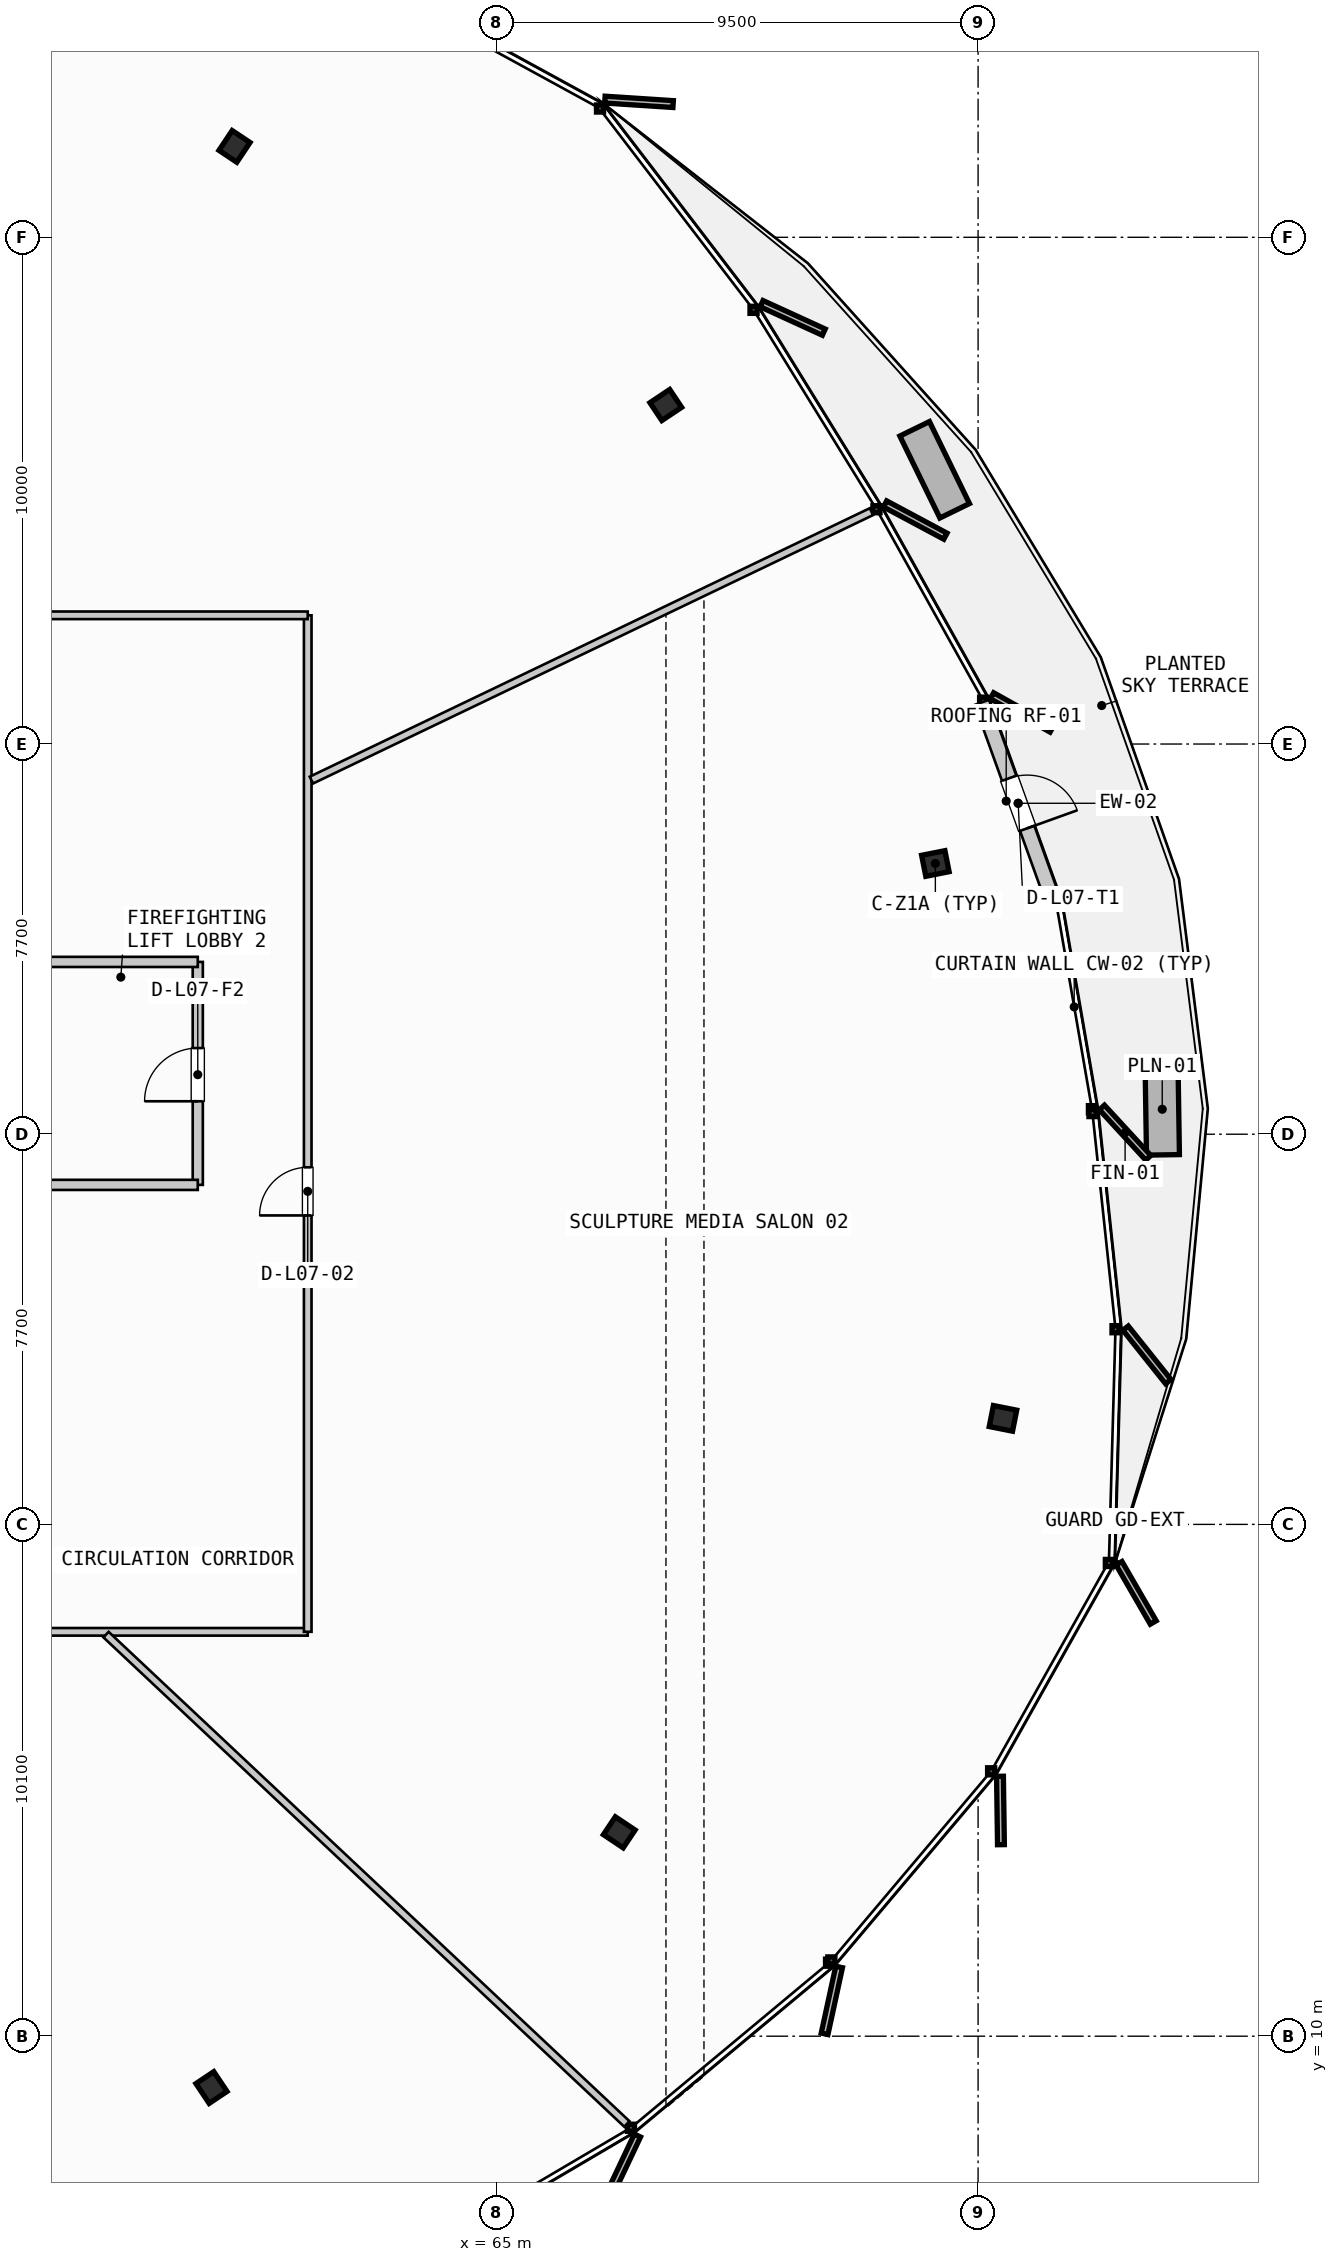
"""IFC4 building model, lengths in metres.
Left out: names, types, materials, properties, quantities, classifications, styles, units other than length and angle.
Written with IfcOpenShell. Run it as: python <this file> out.ifc"""

import sys

from ifc_helpers import new_model, si_unit, direction, frame, frame_2d, origin, origin_2d, place, context, subcontext, project, spatial, rectangle, i_section, extrude, source, transform, mapped, element, fill, save


model = new_model("IFC4")
c1 = context("Model", 3, precision=1e-05, world=origin(), true_north=direction((0.0, 1.0)))
c2 = subcontext(c1, "Body", "Model", "MODEL_VIEW")
j1 = project(units=[si_unit("LENGTHUNIT", "METRE"), si_unit("PLANEANGLEUNIT", "RADIAN")], contexts=[c1])
p1 = place(None, origin())
s1 = spatial("IfcSite", under=j1, at=p1, CompositionType="ELEMENT")
p2 = place(p1, origin())
s2 = spatial("IfcBuilding", under=s1, at=p2, CompositionType="ELEMENT")
p3 = place(p2, frame((0.0, 0.0, 33.4)))
s3 = spatial("IfcBuildingStorey", under=s2, at=p3, CompositionType="ELEMENT", Elevation=33.4)
m1 = source(origin(), c2, "Body", "SweptSolid", [
    extrude(i_section(OverallWidth=0.423, OverallDepth=0.469, WebThickness=0.051, FlangeThickness=0.081, FilletRadius=0.015, at=origin_2d()), origin(), (0.0, 0.0, 1.0), 3.55),
])
for number, where, z_axis, x_axis in (
    (1, (73.657, 33.142, 0.0), (0.0, 0.0, 1.0), (0.981, 0.195, 0.0)),
    (2, (68.336, 42.19, 0.0), (0.0, 0.0, 1.0), (0.831, 0.556, 0.0)),
    (3, (59.825, 47.293, 0.0), (0.0, 0.0, 1.0), (0.556, 0.831, 0.0)),
    (4, (59.37, 8.987, 0.0), (0.0, 0.0, 1.0), (0.556, -0.831, 0.0)),
    (5, (67.418, 14.023, 0.0), (0.0, 0.0, 1.0), (0.831, -0.556, 0.0)),
    (6, (74.991, 22.192, 0.0), (0.0, 0.0, 1.0), (0.981, -0.195, 0.0)),
):
    element("IfcColumn", number, at=place(p3, frame(where, z_axis=z_axis, x_axis=x_axis)), inside=s3, PredefinedType="COLUMN", context=c2, shape_type="MappedRepresentation", body=[
        mapped(m1, transform((0.0, 0.0, 0.0), scale=1.0)),
    ])
p4 = place(p3, frame((74.575, 36.323, 0.0), z_axis=(0.0, 0.0, 1.0), x_axis=(0.338388639347, -0.941006444591, 0.0)))
e7 = element("IfcWall", 7, at=p4, inside=s3, PredefinedType="SOLIDWALL", context=c2, shape_type="SweptSolid", body=[
    extrude(rectangle(XDim=4.234, YDim=0.3, at=frame_2d((2.117, 0.0))), origin(), (0.0, 0.0, 1.0), 2.925),
])
p5 = place(p4, frame((1.592, 0.0, 0.0)))
e8 = element("IfcOpeningElement", 8, at=p5, cuts=e7, PredefinedType="OPENING", context=c2, shape_type="SweptSolid", body=[
    extrude(rectangle(XDim=1.05, YDim=2.2, at=frame_2d((0.525, 1.1))), frame((0.0, 0.16, 0.0), z_axis=(0.0, -1.0, 0.0), x_axis=(1.0, 0.0, 0.0)), (0.0, 0.0, 1.0), 0.32),
])
p6 = place(p3, frame((59.1, 26.8, 0.0), z_axis=(0.0, 0.0, 1.0), x_axis=(0.0, 1.0, 0.0)))
e9 = element("IfcWall", 9, at=p6, inside=s3, PredefinedType="PARTITIONING", context=c2, shape_type="SweptSolid", body=[
    extrude(rectangle(XDim=4.4, YDim=0.2, at=frame_2d((2.2, 0.0))), origin(), (0.0, 0.0, 1.0), 2.925),
])
p7 = place(p6, frame((1.65, 0.0, 0.0)))
e10 = element("IfcOpeningElement", 10, at=p7, cuts=e9, PredefinedType="OPENING", context=c2, shape_type="SweptSolid", body=[
    extrude(rectangle(XDim=1.05, YDim=2.15, at=frame_2d((0.525, 1.075))), frame((0.0, 0.11, 0.0), z_axis=(0.0, -1.0, 0.0), x_axis=(1.0, 0.0, 0.0)), (0.0, 0.0, 1.0), 0.22),
])
for number, where, z_axis, x_axis in (
    (11, (55.96, 26.8, 0.0), (0.0, 0.0, 1.0), (1.0, 0.0, 0.0)),
    (12, (55.96, 31.2, 0.0), (0.0, 0.0, 1.0), (1.0, 0.0, 0.0)),
):
    element("IfcWall", number, at=place(p3, frame(where, z_axis=z_axis, x_axis=x_axis)), inside=s3, PredefinedType="PARTITIONING", context=c2, shape_type="SweptSolid", body=[
        extrude(rectangle(XDim=3.14, YDim=0.2, at=frame_2d((1.57, 0.0))), origin(), (0.0, 0.0, 1.0), 2.925),
    ])
p8 = place(p3, frame((32.85, 17.98, 0.0), z_axis=(0.0, 0.0, 1.0), x_axis=(1.0, 0.0, 0.0)))
e13 = element("IfcWall", 13, at=p8, inside=s3, PredefinedType="PARTITIONING", context=c2, shape_type="SweptSolid", body=[
    extrude(rectangle(XDim=28.42, YDim=0.15, at=frame_2d((14.21, 0.0))), origin(), (0.0, 0.0, 1.0), 2.925),
])
p9 = place(p8, frame((12.07, 0.0, 0.0)))
e14 = element("IfcOpeningElement", 14, at=p9, cuts=e13, PredefinedType="OPENING", context=c2, shape_type="SweptSolid", body=[
    extrude(rectangle(XDim=0.95, YDim=2.15, at=frame_2d((0.475, 1.075))), frame((0.0, 0.085, 0.0), z_axis=(0.0, -1.0, 0.0), x_axis=(1.0, 0.0, 0.0)), (0.0, 0.0, 1.0), 0.17),
])
p10 = place(p3, frame((61.27, 17.98, 0.0), z_axis=(0.0, 0.0, 1.0), x_axis=(0.0, 1.0, 0.0)))
e15 = element("IfcWall", 15, at=p10, inside=s3, PredefinedType="PARTITIONING", context=c2, shape_type="SweptSolid", body=[
    extrude(rectangle(XDim=20.06, YDim=0.15, at=frame_2d((10.03, 0.0))), origin(), (0.0, 0.0, 1.0), 2.925),
])
p11 = place(p10, frame((8.217, 0.0, 0.0)))
e16 = element("IfcOpeningElement", 16, at=p11, cuts=e15, PredefinedType="OPENING", context=c2, shape_type="SweptSolid", body=[
    extrude(rectangle(XDim=0.95, YDim=2.15, at=frame_2d((0.475, 1.075))), frame((0.0, 0.085, 0.0), z_axis=(0.0, -1.0, 0.0), x_axis=(1.0, 0.0, 0.0)), (0.0, 0.0, 1.0), 0.17),
])
p12 = place(p3, frame((61.27, 38.04, 0.0), z_axis=(0.0, 0.0, 1.0), x_axis=(-1.0, 0.0, 0.0)))
e17 = element("IfcWall", 17, at=p12, inside=s3, PredefinedType="PARTITIONING", context=c2, shape_type="SweptSolid", body=[
    extrude(rectangle(XDim=28.42, YDim=0.15, at=frame_2d((14.21, 0.0))), origin(), (0.0, 0.0, 1.0), 2.925),
])
p13 = place(p12, frame((12.522, 0.0, 0.0)))
e18 = element("IfcOpeningElement", 18, at=p13, cuts=e17, PredefinedType="OPENING", context=c2, shape_type="SweptSolid", body=[
    extrude(rectangle(XDim=0.95, YDim=2.15, at=frame_2d((0.475, 1.075))), frame((0.0, 0.085, 0.0), z_axis=(0.0, -1.0, 0.0), x_axis=(1.0, 0.0, 0.0)), (0.0, 0.0, 1.0), 0.17),
])
p14 = place(p3, frame((57.29, 17.925, 0.0), z_axis=(0.0, 0.0, 1.0), x_axis=(0.728808020187, -0.684718095066, 0.0)))
e19 = element("IfcWall", 19, at=p14, inside=s3, PredefinedType="PARTITIONING", context=c2, shape_type="SweptSolid", body=[
    extrude(rectangle(XDim=14.104, YDim=0.15, at=frame_2d((7.052, 0.0))), origin(), (0.0, 0.0, 1.0), 2.925),
])
p15 = place(p3, frame((61.342, 34.788, 0.0), z_axis=(0.0, 0.0, 1.0), x_axis=(0.901775597837, 0.432204547808, 0.0)))
e20 = element("IfcWall", 20, at=p15, inside=s3, PredefinedType="PARTITIONING", context=c2, shape_type="SweptSolid", body=[
    extrude(rectangle(XDim=12.257, YDim=0.15, at=frame_2d((6.128, 0.0))), origin(), (0.0, 0.0, 1.0), 2.925),
])
m2 = source(origin(), c2, "Body", "SweptSolid", [
    extrude(rectangle(XDim=1.05, YDim=2.2, at=frame_2d((0.525, 1.1))), frame((0.0, 0.025, 0.0), z_axis=(0.0, -1.0, 0.0), x_axis=(1.0, 0.0, 0.0)), (0.0, 0.0, 1.0), 0.05),
])
p16 = place(p5, origin())
e21 = element("IfcDoor", 21, at=p16, inside=s3, OperationType="SINGLE_SWING_RIGHT", PredefinedType="DOOR", context=c2, shape_type="MappedRepresentation", body=[
    mapped(m2, transform((0.0, 0.0, 0.0), scale=1.0)),
])
fill(e8, e21)
m3 = source(origin(), c2, "Body", "SweptSolid", [
    extrude(rectangle(XDim=1.05, YDim=2.15, at=frame_2d((0.525, 1.075))), frame((0.0, 0.025, 0.0), z_axis=(0.0, -1.0, 0.0), x_axis=(1.0, 0.0, 0.0)), (0.0, 0.0, 1.0), 0.05),
])
p17 = place(p7, origin())
e22 = element("IfcDoor", 22, at=p17, inside=s3, OperationType="SINGLE_SWING_LEFT", PredefinedType="DOOR", context=c2, shape_type="MappedRepresentation", body=[
    mapped(m3, transform((0.0, 0.0, 0.0), scale=1.0)),
])
fill(e10, e22)
m4 = source(origin(), c2, "Body", "SweptSolid", [
    extrude(rectangle(XDim=0.95, YDim=2.15, at=frame_2d((0.475, 1.075))), frame((0.0, 0.025, 0.0), z_axis=(0.0, -1.0, 0.0), x_axis=(1.0, 0.0, 0.0)), (0.0, 0.0, 1.0), 0.05),
])
p18 = place(p11, origin())
e23 = element("IfcDoor", 23, at=p18, inside=s3, OperationType="SINGLE_SWING_LEFT", PredefinedType="DOOR", context=c2, shape_type="MappedRepresentation", body=[
    mapped(m4, transform((0.0, 0.0, 0.0), scale=1.0)),
])
fill(e16, e23)
save(model, sys.argv[1])
